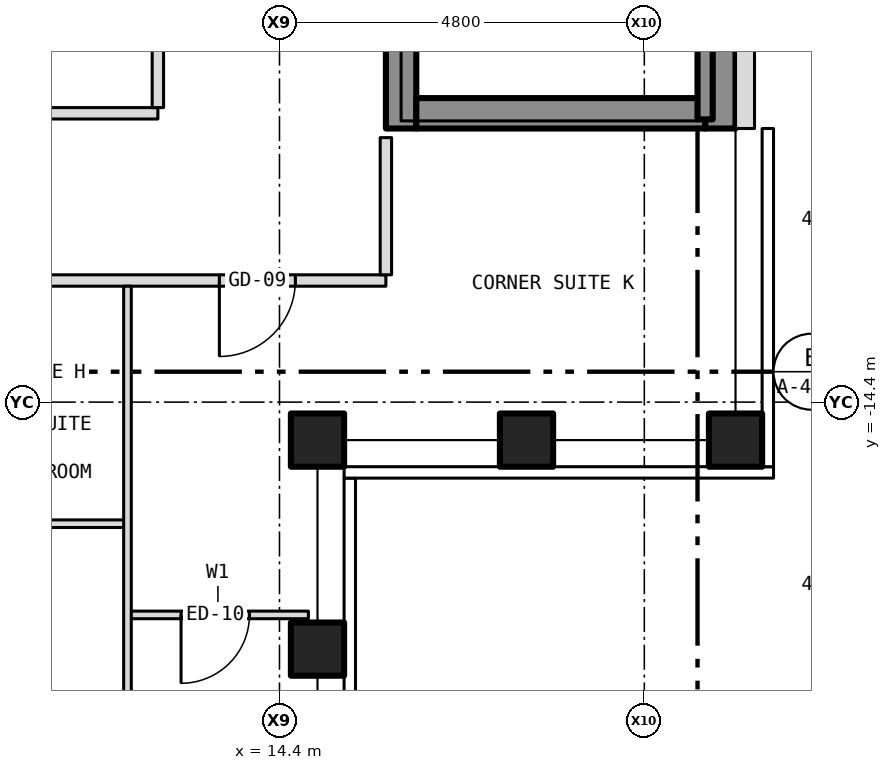
"""IFC4 building model, lengths in metres.
Left out: names, types, materials, properties, quantities, classifications, styles, units other than length and angle.
Written with IfcOpenShell. Run it as: python <this file> out.ifc"""

import sys

from ifc_helpers import new_model, si_unit, direction, frame, frame_2d, origin, origin_2d, place, context, subcontext, project, spatial, rectangle, hollow_rectangle, extrude, element, fill, save


model = new_model("IFC4")
c1 = context("Model", 3, precision=1e-05, world=origin(), true_north=direction((0.0, 1.0)))
c2 = subcontext(c1, "Body", "Model", "MODEL_VIEW")
j1 = project(units=[si_unit("LENGTHUNIT", "METRE"), si_unit("PLANEANGLEUNIT", "RADIAN")], contexts=[c1])
p1 = place(None, origin())
s1 = spatial("IfcSite", under=j1, at=p1, CompositionType="ELEMENT")
p2 = place(p1, origin())
s2 = spatial("IfcBuilding", under=s1, at=p2, CompositionType="ELEMENT")
p3 = place(p2, frame((0.0, 0.0, 215.5)))
s3 = spatial("IfcBuildingStorey", under=s2, at=p3, CompositionType="ELEMENT", Elevation=215.5)
for number, where, z_axis, x_axis in (
    (1, (20.4, -14.9, -0.15), (0.0, 0.0, 1.0), (1.0, 0.0, 0.0)),
    (2, (14.9, -14.9, -0.15), (0.0, 0.0, 1.0), (1.0, 0.0, 0.0)),
    (3, (14.9, -17.65, -0.15), (0.0, 0.0, 1.0), (1.0, 0.0, 0.0)),
    (4, (17.65, -14.9, -0.15), (0.0, 0.0, 1.0), (1.0, 0.0, 0.0)),
):
    element("IfcColumn", number, at=place(p3, frame(where, z_axis=z_axis, x_axis=x_axis)), inside=s3, PredefinedType="COLUMN", context=c2, shape_type="SweptSolid", body=[
        extrude(hollow_rectangle(XDim=0.7, YDim=0.7, WallThickness=0.04, at=origin_2d()), origin(), (0.0, 0.0, 1.0), 3.5),
    ])
p4 = place(p3, frame((16.0, -10.8, 0.0), z_axis=(0.0, 0.0, 1.0), x_axis=(0.0, 1.0, 0.0)))
e5 = element("IfcWall", 5, at=p4, inside=s3, PredefinedType="SHEAR", context=c2, shape_type="SweptSolid", body=[
    extrude(rectangle(XDim=21.6, YDim=0.4, at=frame_2d((10.8, 0.0))), origin(), (0.0, 0.0, 1.0), 3.25),
])
p5 = place(p4, frame((9.4, 0.0, 0.0)))
e6 = element("IfcOpeningElement", 6, at=p5, cuts=e5, PredefinedType="OPENING", context=c2, shape_type="SweptSolid", body=[
    extrude(rectangle(XDim=1.1, YDim=2.1, at=frame_2d((0.55, 1.05))), frame((0.0, 0.212, 0.0), z_axis=(0.0, -1.0, 0.0), x_axis=(1.0, 0.0, 0.0)), (0.0, 0.0, 1.0), 0.424),
])
p6 = place(p4, frame((11.5, 0.0, 0.0)))
e7 = element("IfcOpeningElement", 7, at=p6, cuts=e5, PredefinedType="OPENING", context=c2, shape_type="SweptSolid", body=[
    extrude(rectangle(XDim=1.1, YDim=2.1, at=frame_2d((0.55, 1.05))), frame((0.0, 0.212, 0.0), z_axis=(0.0, -1.0, 0.0), x_axis=(1.0, 0.0, 0.0)), (0.0, 0.0, 1.0), 0.424),
])
p7 = place(p4, frame((13.6, 0.0, 0.0)))
e8 = element("IfcOpeningElement", 8, at=p7, cuts=e5, PredefinedType="OPENING", context=c2, shape_type="SweptSolid", body=[
    extrude(rectangle(XDim=1.1, YDim=2.1, at=frame_2d((0.55, 1.05))), frame((0.0, 0.212, 0.0), z_axis=(0.0, -1.0, 0.0), x_axis=(1.0, 0.0, 0.0)), (0.0, 0.0, 1.0), 0.424),
])
p8 = place(p4, frame((15.7, 0.0, 0.0)))
e9 = element("IfcOpeningElement", 9, at=p8, cuts=e5, PredefinedType="OPENING", context=c2, shape_type="SweptSolid", body=[
    extrude(rectangle(XDim=1.1, YDim=2.1, at=frame_2d((0.55, 1.05))), frame((0.0, 0.212, 0.0), z_axis=(0.0, -1.0, 0.0), x_axis=(1.0, 0.0, 0.0)), (0.0, 0.0, 1.0), 0.424),
])
p9 = place(p4, frame((17.8, 0.0, 0.0)))
e10 = element("IfcOpeningElement", 10, at=p9, cuts=e5, PredefinedType="OPENING", context=c2, shape_type="SweptSolid", body=[
    extrude(rectangle(XDim=1.1, YDim=2.1, at=frame_2d((0.55, 1.05))), frame((0.0, 0.212, 0.0), z_axis=(0.0, -1.0, 0.0), x_axis=(1.0, 0.0, 0.0)), (0.0, 0.0, 1.0), 0.424),
])
p10 = place(p4, frame((5.642, 0.0, 0.0)))
e11 = element("IfcOpeningElement", 11, at=p10, cuts=e5, PredefinedType="OPENING", context=c2, shape_type="SweptSolid", body=[
    extrude(rectangle(XDim=1.1, YDim=2.1, at=frame_2d((0.55, 1.05))), frame((0.0, 0.212, 0.0), z_axis=(0.0, -1.0, 0.0), x_axis=(1.0, 0.0, 0.0)), (0.0, 0.0, 1.0), 0.424),
])
p11 = place(p4, frame((7.5, 0.0, 0.0)))
e12 = element("IfcOpeningElement", 12, at=p11, cuts=e5, PredefinedType="OPENING", context=c2, shape_type="SweptSolid", body=[
    extrude(rectangle(XDim=1.1, YDim=2.1, at=frame_2d((0.55, 1.05))), frame((0.0, 0.212, 0.0), z_axis=(0.0, -1.0, 0.0), x_axis=(1.0, 0.0, 0.0)), (0.0, 0.0, 1.0), 0.424),
])
p12 = place(p4, frame((20.0, 0.0, 0.0)))
e13 = element("IfcOpeningElement", 13, at=p12, cuts=e5, PredefinedType="OPENING", context=c2, shape_type="SweptSolid", body=[
    extrude(rectangle(XDim=0.9, YDim=2.1, at=frame_2d((0.45, 1.05))), frame((0.0, 0.212, 0.0), z_axis=(0.0, -1.0, 0.0), x_axis=(1.0, 0.0, 0.0)), (0.0, 0.0, 1.0), 0.424),
])
p13 = place(p3, frame((20.2, -10.8, 0.0), z_axis=(0.0, 0.0, 1.0), x_axis=(0.0, 1.0, 0.0)))
e14 = element("IfcWall", 14, at=p13, inside=s3, PredefinedType="SHEAR", context=c2, shape_type="SweptSolid", body=[
    extrude(rectangle(XDim=21.6, YDim=0.4, at=frame_2d((10.8, 0.0))), origin(), (0.0, 0.0, 1.0), 3.25),
])
p14 = place(p3, frame((16.2, -10.6, 0.0), z_axis=(0.0, 0.0, 1.0), x_axis=(1.0, 0.0, 0.0)))
e15 = element("IfcWall", 15, at=p14, inside=s3, PredefinedType="SHEAR", context=c2, shape_type="SweptSolid", body=[
    extrude(rectangle(XDim=3.8, YDim=0.4, at=frame_2d((1.9, 0.0))), origin(), (0.0, 0.0, 1.0), 3.25),
])
p15 = place(p3, frame((20.525, -10.8, 0.0), z_axis=(0.0, 0.0, 1.0), x_axis=(0.0, 1.0, 0.0)))
e16 = element("IfcWall", 16, at=p15, inside=s3, PredefinedType="SOLIDWALL", context=c2, shape_type="SweptSolid", body=[
    extrude(rectangle(XDim=21.6, YDim=0.25, at=frame_2d((10.8, 0.0))), origin(), (0.0, 0.0, 1.0), 3.5),
])
p16 = place(p15, frame((2.95, 0.0, 1.0)))
e17 = element("IfcOpeningElement", 17, at=p16, cuts=e16, PredefinedType="OPENING", context=c2, shape_type="SweptSolid", body=[
    extrude(rectangle(XDim=0.6, YDim=1.5, at=frame_2d((0.3, 0.75))), frame((0.0, 0.137, 0.0), z_axis=(0.0, -1.0, 0.0), x_axis=(1.0, 0.0, 0.0)), (0.0, 0.0, 1.0), 0.274),
])
p17 = place(p3, frame((12.4, -17.2, 0.0), z_axis=(0.0, 0.0, 1.0), x_axis=(1.0, 0.0, 0.0)))
e18 = element("IfcWall", 18, at=p17, inside=s3, PredefinedType="PARTITIONING", context=c2, shape_type="SweptSolid", body=[
    extrude(rectangle(XDim=2.38, YDim=0.1, at=frame_2d((1.19, 0.0))), origin(), (0.0, 0.0, 1.0), 3.35),
])
p18 = place(p17, frame((0.705, 0.0, 0.0)))
e19 = element("IfcOpeningElement", 19, at=p18, cuts=e18, PredefinedType="OPENING", context=c2, shape_type="SweptSolid", body=[
    extrude(rectangle(XDim=0.9, YDim=2.1, at=frame_2d((0.45, 1.05))), frame((0.0, 0.062, 0.0), z_axis=(0.0, -1.0, 0.0), x_axis=(1.0, 0.0, 0.0)), (0.0, 0.0, 1.0), 0.124),
])
p19 = place(p3, frame((10.2, -16.0, 0.0), z_axis=(0.0, 0.0, 1.0), x_axis=(1.0, 0.0, 0.0)))
e20 = element("IfcWall", 20, at=p19, inside=s3, PredefinedType="PARTITIONING", context=c2, shape_type="SweptSolid", body=[
    extrude(rectangle(XDim=2.2, YDim=0.1, at=frame_2d((1.1, 0.0))), origin(), (0.0, 0.0, 1.0), 3.35),
])
p20 = place(p3, frame((-15.8, -12.8, 0.0), z_axis=(0.0, 0.0, 1.0), x_axis=(1.0, 0.0, 0.0)))
e21 = element("IfcWall", 21, at=p20, inside=s3, PredefinedType="PARTITIONING", context=c2, shape_type="SweptSolid", body=[
    extrude(rectangle(XDim=31.6, YDim=0.15, at=frame_2d((15.8, 0.0))), origin(), (0.0, 0.0, 1.0), 3.35),
])
p21 = place(p20, frame((6.466, 0.0, 0.0)))
e22 = element("IfcOpeningElement", 22, at=p21, cuts=e21, PredefinedType="OPENING", context=c2, shape_type="SweptSolid", body=[
    extrude(rectangle(XDim=1.0, YDim=2.1, at=frame_2d((0.5, 1.05))), frame((0.0, 0.087, 0.0), z_axis=(0.0, -1.0, 0.0), x_axis=(1.0, 0.0, 0.0)), (0.0, 0.0, 1.0), 0.174),
])
p22 = place(p20, frame((15.548, 0.0, 0.0)))
e23 = element("IfcOpeningElement", 23, at=p22, cuts=e21, PredefinedType="OPENING", context=c2, shape_type="SweptSolid", body=[
    extrude(rectangle(XDim=1.0, YDim=2.1, at=frame_2d((0.5, 1.05))), frame((0.0, 0.087, 0.0), z_axis=(0.0, -1.0, 0.0), x_axis=(1.0, 0.0, 0.0)), (0.0, 0.0, 1.0), 0.174),
])
p23 = place(p20, frame((20.018, 0.0, 0.0)))
e24 = element("IfcOpeningElement", 24, at=p23, cuts=e21, PredefinedType="OPENING", context=c2, shape_type="SweptSolid", body=[
    extrude(rectangle(XDim=1.0, YDim=2.1, at=frame_2d((0.5, 1.05))), frame((0.0, 0.087, 0.0), z_axis=(0.0, -1.0, 0.0), x_axis=(1.0, 0.0, 0.0)), (0.0, 0.0, 1.0), 0.174),
])
p24 = place(p20, frame((1.192, 0.0, 0.0)))
e25 = element("IfcOpeningElement", 25, at=p24, cuts=e21, PredefinedType="OPENING", context=c2, shape_type="SweptSolid", body=[
    extrude(rectangle(XDim=1.0, YDim=2.1, at=frame_2d((0.5, 1.05))), frame((0.0, 0.087, 0.0), z_axis=(0.0, -1.0, 0.0), x_axis=(1.0, 0.0, 0.0)), (0.0, 0.0, 1.0), 0.174),
])
p25 = place(p20, frame((29.409, 0.0, 0.0)))
e26 = element("IfcOpeningElement", 26, at=p25, cuts=e21, PredefinedType="OPENING", context=c2, shape_type="SweptSolid", body=[
    extrude(rectangle(XDim=1.0, YDim=2.1, at=frame_2d((0.5, 1.05))), frame((0.0, 0.087, 0.0), z_axis=(0.0, -1.0, 0.0), x_axis=(1.0, 0.0, 0.0)), (0.0, 0.0, 1.0), 0.174),
])
p26 = place(p3, frame((3.3, -10.6, 0.0), z_axis=(0.0, 0.0, 1.0), x_axis=(1.0, 0.0, 0.0)))
e27 = element("IfcWall", 27, at=p26, inside=s3, PredefinedType="PARTITIONING", context=c2, shape_type="SweptSolid", body=[
    extrude(rectangle(XDim=9.5, YDim=0.15, at=frame_2d((4.75, 0.0))), origin(), (0.0, 0.0, 1.0), 3.35),
])
p27 = place(p3, frame((12.4, -20.78, 0.0), z_axis=(0.0, 0.0, 1.0), x_axis=(0.0, 1.0, 0.0)))
e28 = element("IfcWall", 28, at=p27, inside=s3, PredefinedType="PARTITIONING", context=c2, shape_type="SweptSolid", body=[
    extrude(rectangle(XDim=7.905, YDim=0.1, at=frame_2d((3.953, 0.0))), origin(), (0.0, 0.0, 1.0), 3.35),
])
p28 = place(p3, frame((12.8, -10.525, 0.0), z_axis=(0.0, 0.0, 1.0), x_axis=(0.0, 1.0, 0.0)))
e29 = element("IfcWall", 29, at=p28, inside=s3, PredefinedType="PARTITIONING", context=c2, shape_type="SweptSolid", body=[
    extrude(rectangle(XDim=8.525, YDim=0.15, at=frame_2d((4.262, 0.0))), origin(), (0.0, 0.0, 1.0), 3.35),
])
p29 = place(p3, frame((15.8, -12.725, 0.0), z_axis=(0.0, 0.0, 1.0), x_axis=(0.0, 1.0, 0.0)))
e30 = element("IfcWall", 30, at=p29, inside=s3, PredefinedType="PARTITIONING", context=c2, shape_type="SweptSolid", body=[
    extrude(rectangle(XDim=1.805, YDim=0.15, at=frame_2d((0.903, 0.0))), origin(), (0.0, 0.0, 1.0), 3.35),
])
p30 = place(p3, frame((20.0, -10.68, 0.0), z_axis=(0.0, 0.0, 1.0), x_axis=(0.0, 1.0, 0.0)))
e31 = element("IfcWall", 31, at=p30, inside=s3, PredefinedType="SHEAR", context=c2, shape_type="SweptSolid", body=[
    extrude(rectangle(XDim=6.98, YDim=0.2, at=frame_2d((3.49, 0.0))), origin(), (0.0, 0.0, 1.0), 3.25),
])
p31 = place(p18, origin())
e32 = element("IfcDoor", 32, at=p31, inside=s3, OperationType="SINGLE_SWING_LEFT", PredefinedType="DOOR", context=c2, shape_type="SweptSolid", body=[
    extrude(rectangle(XDim=0.9, YDim=2.1, at=frame_2d((0.45, 1.05))), frame((0.0, 0.025, 0.0), z_axis=(0.0, -1.0, 0.0), x_axis=(1.0, 0.0, 0.0)), (0.0, 0.0, 1.0), 0.05),
])
fill(e19, e32)
p32 = place(p25, origin())
e33 = element("IfcDoor", 33, at=p32, inside=s3, OperationType="SINGLE_SWING_LEFT", PredefinedType="DOOR", context=c2, shape_type="SweptSolid", body=[
    extrude(rectangle(XDim=1.0, YDim=2.1, at=frame_2d((0.5, 1.05))), frame((0.0, 0.025, 0.0), z_axis=(0.0, -1.0, 0.0), x_axis=(1.0, 0.0, 0.0)), (0.0, 0.0, 1.0), 0.05),
])
fill(e26, e33)
save(model, sys.argv[1])
